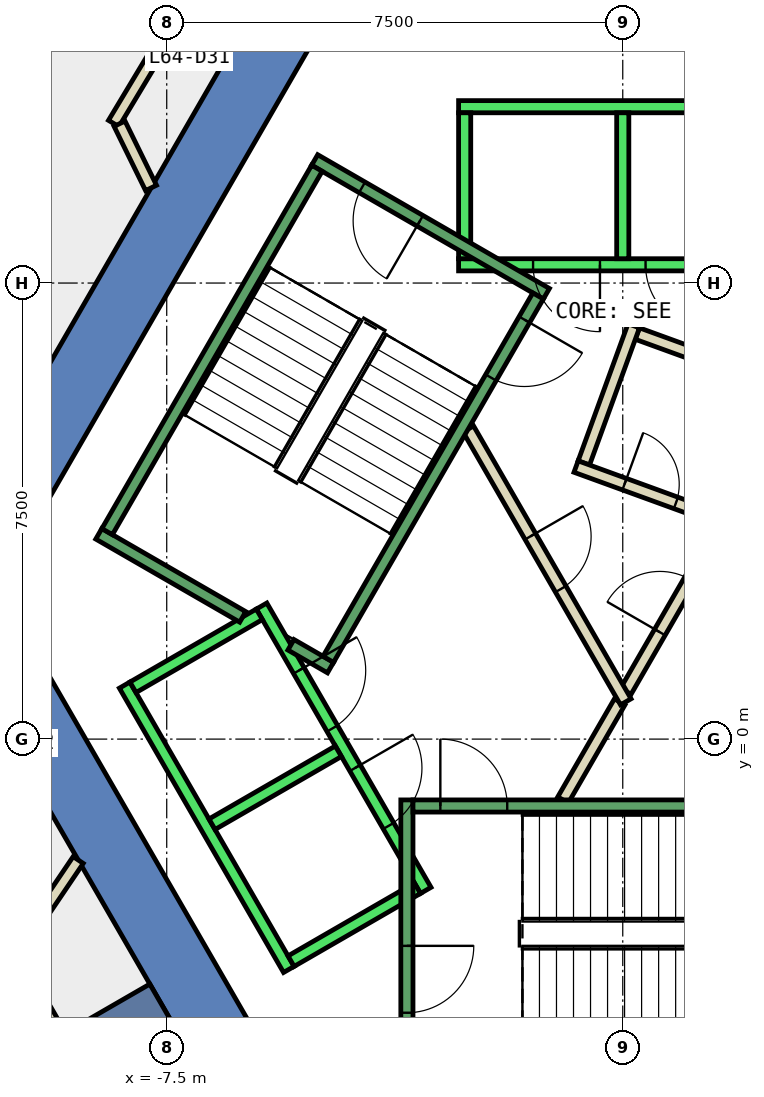
"""IFC4 building model, lengths in metres.
Left out: names, types, materials, properties, quantities, classifications, styles, units other than length and angle.
Written with IfcOpenShell. Run it as: python <this file> out.ifc"""

import sys

from ifc_helpers import new_model, si_unit, direction, frame, frame_2d, origin, place, context, subcontext, project, spatial, polyline, rectangle, outline, extrude, element, fill, save


model = new_model("IFC4")
c1 = context("Model", 3, precision=1e-05, world=origin(), true_north=direction((0.0, 1.0)))
c2 = subcontext(c1, "Body", "Model", "MODEL_VIEW")
j1 = project(units=[si_unit("LENGTHUNIT", "METRE"), si_unit("PLANEANGLEUNIT", "RADIAN")], contexts=[c1])
p1 = place(None, origin())
s1 = spatial("IfcSite", under=j1, at=p1, CompositionType="ELEMENT")
p2 = place(p1, origin())
s2 = spatial("IfcBuilding", under=s1, at=p2, CompositionType="ELEMENT")
p3 = place(p2, frame((0.0, 0.0, 277.4)))
s3 = spatial("IfcBuildingStorey", under=s2, at=p3, CompositionType="ELEMENT", Elevation=277.4)
p4 = place(p3, frame((0.0, 0.0, -0.34)))
e1 = element("IfcWall", 1, at=p4, inside=s3, PredefinedType="SHEAR", context=c2, shape_type="SweptSolid", body=[
    extrude(outline(polyline([(-10.535, 4.253), (-9.583, 3.703), (-5.138, 11.4), (-5.774, 12.5), (-10.535, 4.253)])), origin(), (0.0, 0.0, 1.0), 3.34),
])
p5 = place(p3, frame((0.0, 0.0, -0.34)))
e2 = element("IfcWall", 2, at=p5, inside=s3, PredefinedType="SHEAR", context=c2, shape_type="SweptSolid", body=[
    extrude(outline(polyline([(-11.547, 2.5), (-5.774, -7.5), (-5.138, -6.4), (-10.277, 2.5), (-11.547, 2.5)])), origin(), (0.0, 0.0, 1.0), 3.34),
])
p6 = place(p3, frame((-7.578, -4.375, -0.34), z_axis=(0.0, 0.0, 1.0), x_axis=(-0.866024315419, -0.5000018851, 0.0)))
e3 = element("IfcWall", 3, at=p6, inside=s3, PredefinedType="SHEAR", context=c2, shape_type="SweptSolid", body=[
    extrude(rectangle(XDim=9.0, YDim=0.8, at=frame_2d((4.5, 0.0))), origin(), (0.0, 0.0, 1.0), 3.34),
])
p7 = place(p3, frame((2.005, 6.027, 0.0), z_axis=(0.0, 0.0, 1.0), x_axis=(-0.93978203596, 0.341774377167, 0.0)))
e4 = element("IfcWall", 4, at=p7, inside=s3, PredefinedType="PARTITIONING", context=c2, shape_type="SweptSolid", body=[
    extrude(rectangle(XDim=1.878, YDim=0.2, at=frame_2d((0.939, 0.0))), origin(), (0.0, 0.0, 1.0), 3.0),
])
p8 = place(p3, frame((0.181, 6.797, 0.0), z_axis=(0.0, 0.0, 1.0), x_axis=(-0.342020767299, -0.939692393678, 0.0)))
e5 = element("IfcWall", 5, at=p8, inside=s3, PredefinedType="PARTITIONING", context=c2, shape_type="SweptSolid", body=[
    extrude(rectangle(XDim=2.4, YDim=0.2, at=frame_2d((1.2, 0.0))), origin(), (0.0, 0.0, 1.0), 3.0),
])
p9 = place(p3, frame((-0.768, 4.482, 0.0), z_axis=(0.0, 0.0, 1.0), x_axis=(0.939664280748, -0.342097996905, 0.0)))
e6 = element("IfcWall", 6, at=p9, inside=s3, PredefinedType="PARTITIONING", context=c2, shape_type="SweptSolid", body=[
    extrude(rectangle(XDim=2.595, YDim=0.2, at=frame_2d((1.298, 0.0))), origin(), (0.0, 0.0, 1.0), 3.0),
])
p10 = place(p9, frame((0.848, 0.0, 0.0)))
e7 = element("IfcOpeningElement", 7, at=p10, cuts=e6, PredefinedType="OPENING", context=c2, shape_type="SweptSolid", body=[
    extrude(rectangle(XDim=0.9, YDim=2.1, at=frame_2d((0.45, 1.05))), frame((0.0, 0.11, 0.0), z_axis=(0.0, -1.0, 0.0), x_axis=(1.0, 0.0, 0.0)), (0.0, 0.0, 1.0), 0.22),
])
p11 = place(p3, frame((-5.885, 14.264, 0.0), z_axis=(0.0, 0.0, 1.0), x_axis=(-0.514971458129, -0.857207324579, 0.0)))
e8 = element("IfcWall", 8, at=p11, inside=s3, PredefinedType="PARTITIONING", context=c2, shape_type="SweptSolid", body=[
    extrude(rectangle(XDim=4.83, YDim=0.2, at=frame_2d((2.415, 0.0))), origin(), (0.0, 0.0, 1.0), 3.0),
])
p12 = place(p11, frame((1.915, 0.0, 0.0)))
e9 = element("IfcOpeningElement", 9, at=p12, cuts=e8, PredefinedType="OPENING", context=c2, shape_type="SweptSolid", body=[
    extrude(rectangle(XDim=1.0, YDim=2.1, at=frame_2d((0.5, 1.05))), frame((0.0, 0.11, 0.0), z_axis=(0.0, -1.0, 0.0), x_axis=(1.0, 0.0, 0.0)), (0.0, 0.0, 1.0), 0.22),
])
p13 = place(p3, frame((-8.276, 10.12, 0.0), z_axis=(0.0, 0.0, 1.0), x_axis=(0.440226122236, -0.897886942382, 0.0)))
e10 = element("IfcWall", 10, at=p13, inside=s3, PredefinedType="PARTITIONING", context=c2, shape_type="SweptSolid", body=[
    extrude(rectangle(XDim=1.176, YDim=0.2, at=frame_2d((0.588, 0.0))), origin(), (0.0, 0.0, 1.0), 3.0),
])
p14 = place(p3, frame((-10.789, 9.985, 0.0), z_axis=(0.0, 0.0, 1.0), x_axis=(0.51487988517, 0.857262330823, 0.0)))
e11 = element("IfcWall", 11, at=p14, inside=s3, PredefinedType="PARTITIONING", context=c2, shape_type="SweptSolid", body=[
    extrude(rectangle(XDim=3.177, YDim=0.2, at=frame_2d((1.589, 0.0))), origin(), (0.0, 0.0, 1.0), 3.0),
])
p15 = place(p14, frame((1.089, 0.0, 0.0)))
e12 = element("IfcOpeningElement", 12, at=p15, cuts=e11, PredefinedType="OPENING", context=c2, shape_type="SweptSolid", body=[
    extrude(rectangle(XDim=1.0, YDim=2.1, at=frame_2d((0.5, 1.05))), frame((0.0, 0.11, 0.0), z_axis=(0.0, -1.0, 0.0), x_axis=(1.0, 0.0, 0.0)), (0.0, 0.0, 1.0), 0.22),
])
p16 = place(p3, frame((-10.028, -3.575, 0.0), z_axis=(0.0, 0.0, 1.0), x_axis=(0.559779346026, 0.828641710127, 0.0)))
e13 = element("IfcWall", 13, at=p16, inside=s3, PredefinedType="PARTITIONING", context=c2, shape_type="SweptSolid", body=[
    extrude(rectangle(XDim=1.915, YDim=0.2, at=frame_2d((0.958, 0.0))), origin(), (0.0, 0.0, 1.0), 3.0),
])
p17 = place(p3, frame((-0.982, -1.0, 0.0), z_axis=(0.0, 0.0, 1.0), x_axis=(0.50024047865, 0.865886518847, 0.0)))
e14 = element("IfcWall", 14, at=p17, inside=s3, PredefinedType="PARTITIONING", context=c2, shape_type="SweptSolid", body=[
    extrude(rectangle(XDim=1.863, YDim=0.2, at=frame_2d((0.931, 0.0))), origin(), (0.0, 0.0, 1.0), 3.0),
])
p18 = place(p3, frame((0.05, 0.787, 0.0), z_axis=(0.0, 0.0, 1.0), x_axis=(0.500036563046, 0.866004293071, 0.0)))
e15 = element("IfcWall", 15, at=p18, inside=s3, PredefinedType="PARTITIONING", context=c2, shape_type="SweptSolid", body=[
    extrude(rectangle(XDim=3.342, YDim=0.2, at=frame_2d((1.671, 0.0))), origin(), (0.0, 0.0, 1.0), 3.0),
])
p19 = place(p18, frame((1.121, 0.0, 0.0)))
e16 = element("IfcOpeningElement", 16, at=p19, cuts=e15, PredefinedType="OPENING", context=c2, shape_type="SweptSolid", body=[
    extrude(rectangle(XDim=1.0, YDim=2.1, at=frame_2d((0.5, 1.05))), frame((0.0, 0.11, 0.0), z_axis=(0.0, -1.0, 0.0), x_axis=(1.0, 0.0, 0.0)), (0.0, 0.0, 1.0), 0.22),
])
p20 = place(p3, frame((-2.54, 5.1, 0.0), z_axis=(0.0, 0.0, 1.0), x_axis=(0.499925051871, -0.866068670783, 0.0)))
e17 = element("IfcWall", 17, at=p20, inside=s3, PredefinedType="PARTITIONING", context=c2, shape_type="SweptSolid", body=[
    extrude(rectangle(XDim=5.181, YDim=0.2, at=frame_2d((2.59, 0.0))), origin(), (0.0, 0.0, 1.0), 3.0),
])
p21 = place(p20, frame((2.04, 0.0, 0.0)))
e18 = element("IfcOpeningElement", 18, at=p21, cuts=e17, PredefinedType="OPENING", context=c2, shape_type="SweptSolid", body=[
    extrude(rectangle(XDim=1.0, YDim=2.1, at=frame_2d((0.5, 1.05))), frame((0.0, 0.11, 0.0), z_axis=(0.0, -1.0, 0.0), x_axis=(1.0, 0.0, 0.0)), (0.0, 0.0, 1.0), 0.22),
])
p22 = place(p3, frame((-9.316, -4.764, 0.0), z_axis=(0.0, 0.0, 1.0), x_axis=(-0.49996696679, 0.866044474677, 0.0)))
e19 = element("IfcWall", 19, at=p22, inside=s3, PredefinedType="PARTITIONING", context=c2, shape_type="SweptSolid", body=[
    extrude(rectangle(XDim=1.296, YDim=0.2, at=frame_2d((0.648, 0.0))), origin(), (0.0, 0.0, 1.0), 3.0),
])
p23 = place(p3, frame((2.7, 7.8, 0.0), z_axis=(0.0, 0.0, 1.0), x_axis=(-1.0, 0.0, 0.0)))
e20 = element("IfcWall", 20, at=p23, inside=s3, PredefinedType="STANDARD", context=c2, shape_type="SweptSolid", body=[
    extrude(rectangle(XDim=5.4, YDim=0.2, at=frame_2d((2.7, 0.0))), origin(), (0.0, 0.0, 1.0), 3.0),
])
p24 = place(p23, frame((1.225, 0.0, 0.0)))
e21 = element("IfcOpeningElement", 21, at=p24, cuts=e20, PredefinedType="OPENING", context=c2, shape_type="SweptSolid", body=[
    extrude(rectangle(XDim=1.1, YDim=2.1, at=frame_2d((0.55, 1.05))), frame((0.0, 0.11, 0.0), z_axis=(0.0, -1.0, 0.0), x_axis=(1.0, 0.0, 0.0)), (0.0, 0.0, 1.0), 0.22),
])
p25 = place(p23, frame((3.075, 0.0, 0.0)))
e22 = element("IfcOpeningElement", 22, at=p25, cuts=e20, PredefinedType="OPENING", context=c2, shape_type="SweptSolid", body=[
    extrude(rectangle(XDim=1.1, YDim=2.1, at=frame_2d((0.55, 1.05))), frame((0.0, 0.11, 0.0), z_axis=(0.0, -1.0, 0.0), x_axis=(1.0, 0.0, 0.0)), (0.0, 0.0, 1.0), 0.22),
])
p26 = place(p3, frame((2.7, 10.4, 0.0), z_axis=(0.0, 0.0, 1.0), x_axis=(-1.0, 0.0, 0.0)))
e23 = element("IfcWall", 23, at=p26, inside=s3, PredefinedType="STANDARD", context=c2, shape_type="SweptSolid", body=[
    extrude(rectangle(XDim=5.4, YDim=0.2, at=frame_2d((2.7, 0.0))), origin(), (0.0, 0.0, 1.0), 3.0),
])
for number, where, z_axis, x_axis in (
    (24, (0.0, 7.9, 0.0), (0.0, 0.0, 1.0), (0.0, 1.0, 0.0)),
    (25, (-2.6, 7.9, 0.0), (0.0, 0.0, 1.0), (0.0, 1.0, 0.0)),
):
    element("IfcWall", number, at=place(p3, frame(where, z_axis=z_axis, x_axis=x_axis)), inside=s3, PredefinedType="STANDARD", context=c2, shape_type="SweptSolid", body=[
        extrude(rectangle(XDim=2.4, YDim=0.2, at=frame_2d((1.2, 0.0))), origin(), (0.0, 0.0, 1.0), 3.0),
    ])
p27 = place(p3, frame((-5.94, 2.188, 0.0), z_axis=(0.0, 0.0, 1.0), x_axis=(0.500034260056, -0.866005622828, 0.0)))
e26 = element("IfcWall", 26, at=p27, inside=s3, PredefinedType="STANDARD", context=c2, shape_type="SweptSolid", body=[
    extrude(rectangle(XDim=5.399, YDim=0.2, at=frame_2d((2.7, 0.0))), origin(), (0.0, 0.0, 1.0), 3.0),
])
p28 = place(p27, frame((3.075, 0.0, 0.0)))
e27 = element("IfcOpeningElement", 27, at=p28, cuts=e26, PredefinedType="OPENING", context=c2, shape_type="SweptSolid", body=[
    extrude(rectangle(XDim=1.1, YDim=2.1, at=frame_2d((0.55, 1.05))), frame((0.0, 0.11, 0.0), z_axis=(0.0, -1.0, 0.0), x_axis=(1.0, 0.0, 0.0)), (0.0, 0.0, 1.0), 0.22),
])
p29 = place(p27, frame((1.225, 0.0, 0.0)))
e28 = element("IfcOpeningElement", 28, at=p29, cuts=e26, PredefinedType="OPENING", context=c2, shape_type="SweptSolid", body=[
    extrude(rectangle(XDim=1.1, YDim=2.1, at=frame_2d((0.55, 1.05))), frame((0.0, 0.11, 0.0), z_axis=(0.0, -1.0, 0.0), x_axis=(1.0, 0.0, 0.0)), (0.0, 0.0, 1.0), 0.22),
])
p30 = place(p3, frame((-8.192, 0.888, 0.0), z_axis=(0.0, 0.0, 1.0), x_axis=(0.500034260056, -0.866005622828, 0.0)))
e29 = element("IfcWall", 29, at=p30, inside=s3, PredefinedType="STANDARD", context=c2, shape_type="SweptSolid", body=[
    extrude(rectangle(XDim=5.399, YDim=0.2, at=frame_2d((2.7, 0.0))), origin(), (0.0, 0.0, 1.0), 3.0),
])
for number, where, z_axis, x_axis in (
    (30, (-5.977, 2.052, 0.0), (0.0, 0.0, 1.0), (-0.866, -0.5, 0.0)),
    (31, (-4.677, -0.2, 0.0), (0.0, 0.0, 1.0), (-0.866, -0.5, 0.0)),
):
    element("IfcWall", number, at=place(p3, frame(where, z_axis=z_axis, x_axis=x_axis)), inside=s3, PredefinedType="STANDARD", context=c2, shape_type="SweptSolid", body=[
        extrude(rectangle(XDim=2.399, YDim=0.2, at=frame_2d((1.2, 0.0))), origin(), (0.0, 0.0, 1.0), 3.0),
    ])
p31 = place(p3, frame((-3.377, -2.452, 0.0), z_axis=(0.0, 0.0, 1.0), x_axis=(-0.865955154139, -0.50012165622, 0.0)))
e32 = element("IfcWall", 32, at=p31, inside=s3, PredefinedType="STANDARD", context=c2, shape_type="SweptSolid", body=[
    extrude(rectangle(XDim=2.4, YDim=0.2, at=frame_2d((1.2, 0.0))), origin(), (0.0, 0.0, 1.0), 3.0),
])
p32 = place(p3, frame((-3.55, -1.0, 0.0), z_axis=(0.0, 0.0, 1.0), x_axis=(0.0, -1.0, 0.0)))
e33 = element("IfcWall", 33, at=p32, inside=s3, PredefinedType="STANDARD", context=c2, shape_type="SweptSolid", body=[
    extrude(rectangle(XDim=4.4, YDim=0.2, at=frame_2d((2.2, 0.0))), origin(), (0.0, 0.0, 1.0), 3.0),
])
p33 = place(p32, frame((2.4, 0.0, 0.0)))
e34 = element("IfcOpeningElement", 34, at=p33, cuts=e33, PredefinedType="OPENING", context=c2, shape_type="SweptSolid", body=[
    extrude(rectangle(XDim=1.1, YDim=2.2, at=frame_2d((0.55, 1.1))), frame((0.0, 0.11, 0.0), z_axis=(0.0, -1.0, 0.0), x_axis=(1.0, 0.0, 0.0)), (0.0, 0.0, 1.0), 0.22),
])
p34 = place(p3, frame((-3.45, -1.1, 0.0), z_axis=(0.0, 0.0, 1.0), x_axis=(1.0, 0.0, 0.0)))
e35 = element("IfcWall", 35, at=p34, inside=s3, PredefinedType="STANDARD", context=c2, shape_type="SweptSolid", body=[
    extrude(rectangle(XDim=6.9, YDim=0.2, at=frame_2d((3.45, 0.0))), origin(), (0.0, 0.0, 1.0), 3.0),
])
p35 = place(p34, frame((0.45, 0.0, 0.0)))
e36 = element("IfcOpeningElement", 36, at=p35, cuts=e35, PredefinedType="OPENING", context=c2, shape_type="SweptSolid", body=[
    extrude(rectangle(XDim=1.1, YDim=2.2, at=frame_2d((0.55, 1.1))), frame((0.0, 0.11, 0.0), z_axis=(0.0, -1.0, 0.0), x_axis=(1.0, 0.0, 0.0)), (0.0, 0.0, 1.0), 0.22),
])
p36 = place(p3, frame((-1.256, 7.324, 0.0), z_axis=(0.0, 0.0, 1.0), x_axis=(-0.866046073146, 0.499964197906, 0.0)))
e37 = element("IfcWall", 37, at=p36, inside=s3, PredefinedType="STANDARD", context=c2, shape_type="SweptSolid", body=[
    extrude(rectangle(XDim=4.4, YDim=0.2, at=frame_2d((2.2, 0.0))), origin(), (0.0, 0.0, 1.0), 3.0),
])
p37 = place(p36, frame((2.4, 0.0, 0.0)))
e38 = element("IfcOpeningElement", 38, at=p37, cuts=e37, PredefinedType="OPENING", context=c2, shape_type="SweptSolid", body=[
    extrude(rectangle(XDim=1.1, YDim=2.2, at=frame_2d((0.55, 1.1))), frame((0.0, 0.11, 0.0), z_axis=(0.0, -1.0, 0.0), x_axis=(1.0, 0.0, 0.0)), (0.0, 0.0, 1.0), 0.22),
])
p38 = place(p3, frame((-6.25, 2.01, 0.0), z_axis=(0.0, 0.0, 1.0), x_axis=(-0.86611865017, 0.499838457731, 0.0)))
e39 = element("IfcWall", 39, at=p38, inside=s3, PredefinedType="STANDARD", context=c2, shape_type="SweptSolid", body=[
    extrude(rectangle(XDim=2.733, YDim=0.2, at=frame_2d((1.366, 0.0))), origin(), (0.0, 0.0, 1.0), 3.0),
])
p39 = place(p3, frame((-4.806, 1.176, 0.0), z_axis=(0.0, 0.0, 1.0), x_axis=(-0.866558586415, 0.499075361355, 0.0)))
e40 = element("IfcWall", 40, at=p39, inside=s3, PredefinedType="STANDARD", context=c2, shape_type="SweptSolid", body=[
    extrude(rectangle(XDim=0.751, YDim=0.2, at=frame_2d((0.376, 0.0))), origin(), (0.0, 0.0, 1.0), 3.0),
])
p40 = place(p3, frame((-1.393, 7.288, 0.0), z_axis=(0.0, 0.0, 1.0), x_axis=(-0.499963383562, -0.866046543262, 0.0)))
e41 = element("IfcWall", 41, at=p40, inside=s3, PredefinedType="STANDARD", context=c2, shape_type="SweptSolid", body=[
    extrude(rectangle(XDim=6.9, YDim=0.2, at=frame_2d((3.45, 0.0))), origin(), (0.0, 0.0, 1.0), 3.0),
])
p41 = place(p40, frame((0.45, 0.0, 0.0)))
e42 = element("IfcOpeningElement", 42, at=p41, cuts=e41, PredefinedType="OPENING", context=c2, shape_type="SweptSolid", body=[
    extrude(rectangle(XDim=1.1, YDim=2.2, at=frame_2d((0.55, 1.1))), frame((0.0, 0.11, 0.0), z_axis=(0.0, -1.0, 0.0), x_axis=(1.0, 0.0, 0.0)), (0.0, 0.0, 1.0), 0.22),
])
p42 = place(p3, frame((-5.03, 9.388, 0.0), z_axis=(0.0, 0.0, 1.0), x_axis=(-0.499978703459, -0.866037698999, 0.0)))
e43 = element("IfcWall", 43, at=p42, inside=s3, PredefinedType="STANDARD", context=c2, shape_type="SweptSolid", body=[
    extrude(rectangle(XDim=6.9, YDim=0.2, at=frame_2d((3.45, 0.0))), origin(), (0.0, 0.0, 1.0), 3.0),
])
p43 = place(p19, origin())
e44 = element("IfcDoor", 44, at=p43, inside=s3, OperationType="SINGLE_SWING_LEFT", PredefinedType="DOOR", context=c2, shape_type="SweptSolid", body=[
    extrude(rectangle(XDim=1.0, YDim=2.1, at=frame_2d((0.5, 1.05))), frame((0.0, 0.025, 0.0), z_axis=(0.0, -1.0, 0.0), x_axis=(1.0, 0.0, 0.0)), (0.0, 0.0, 1.0), 0.05),
])
fill(e16, e44)
p44 = place(p21, origin())
e45 = element("IfcDoor", 45, at=p44, inside=s3, OperationType="SINGLE_SWING_LEFT", PredefinedType="DOOR", context=c2, shape_type="SweptSolid", body=[
    extrude(rectangle(XDim=1.0, YDim=2.1, at=frame_2d((0.5, 1.05))), frame((0.0, 0.025, 0.0), z_axis=(0.0, -1.0, 0.0), x_axis=(1.0, 0.0, 0.0)), (0.0, 0.0, 1.0), 0.05),
])
fill(e18, e45)
p45 = place(p10, origin())
e46 = element("IfcDoor", 46, at=p45, inside=s3, OperationType="SINGLE_SWING_LEFT", PredefinedType="DOOR", context=c2, shape_type="SweptSolid", body=[
    extrude(rectangle(XDim=0.9, YDim=2.1, at=frame_2d((0.45, 1.05))), frame((0.0, 0.025, 0.0), z_axis=(0.0, -1.0, 0.0), x_axis=(1.0, 0.0, 0.0)), (0.0, 0.0, 1.0), 0.05),
])
fill(e7, e46)
p46 = place(p24, origin())
e47 = element("IfcDoor", 47, at=p46, inside=s3, OperationType="SLIDING_TO_LEFT", PredefinedType="DOOR", context=c2, shape_type="SweptSolid", body=[
    extrude(rectangle(XDim=1.1, YDim=2.1, at=frame_2d((0.55, 1.05))), frame((0.0, 0.025, 0.0), z_axis=(0.0, -1.0, 0.0), x_axis=(1.0, 0.0, 0.0)), (0.0, 0.0, 1.0), 0.05),
])
fill(e21, e47)
p47 = place(p25, origin())
e48 = element("IfcDoor", 48, at=p47, inside=s3, OperationType="SLIDING_TO_LEFT", PredefinedType="DOOR", context=c2, shape_type="SweptSolid", body=[
    extrude(rectangle(XDim=1.1, YDim=2.1, at=frame_2d((0.55, 1.05))), frame((0.0, 0.025, 0.0), z_axis=(0.0, -1.0, 0.0), x_axis=(1.0, 0.0, 0.0)), (0.0, 0.0, 1.0), 0.05),
])
fill(e22, e48)
p48 = place(p28, origin())
e49 = element("IfcDoor", 49, at=p48, inside=s3, OperationType="SLIDING_TO_LEFT", PredefinedType="DOOR", context=c2, shape_type="SweptSolid", body=[
    extrude(rectangle(XDim=1.1, YDim=2.1, at=frame_2d((0.55, 1.05))), frame((0.0, 0.025, 0.0), z_axis=(0.0, -1.0, 0.0), x_axis=(1.0, 0.0, 0.0)), (0.0, 0.0, 1.0), 0.05),
])
fill(e27, e49)
p49 = place(p29, origin())
e50 = element("IfcDoor", 50, at=p49, inside=s3, OperationType="SLIDING_TO_LEFT", PredefinedType="DOOR", context=c2, shape_type="SweptSolid", body=[
    extrude(rectangle(XDim=1.1, YDim=2.1, at=frame_2d((0.55, 1.05))), frame((0.0, 0.025, 0.0), z_axis=(0.0, -1.0, 0.0), x_axis=(1.0, 0.0, 0.0)), (0.0, 0.0, 1.0), 0.05),
])
fill(e28, e50)
p50 = place(p35, origin())
e51 = element("IfcDoor", 51, at=p50, inside=s3, OperationType="SINGLE_SWING_LEFT", PredefinedType="DOOR", context=c2, shape_type="SweptSolid", body=[
    extrude(rectangle(XDim=1.1, YDim=2.2, at=frame_2d((0.55, 1.1))), frame((0.0, 0.025, 0.0), z_axis=(0.0, -1.0, 0.0), x_axis=(1.0, 0.0, 0.0)), (0.0, 0.0, 1.0), 0.05),
])
fill(e36, e51)
p51 = place(p33, origin())
e52 = element("IfcDoor", 52, at=p51, inside=s3, OperationType="SINGLE_SWING_LEFT", PredefinedType="DOOR", context=c2, shape_type="SweptSolid", body=[
    extrude(rectangle(XDim=1.1, YDim=2.2, at=frame_2d((0.55, 1.1))), frame((0.0, 0.025, 0.0), z_axis=(0.0, -1.0, 0.0), x_axis=(1.0, 0.0, 0.0)), (0.0, 0.0, 1.0), 0.05),
])
fill(e34, e52)
p52 = place(p41, origin())
e53 = element("IfcDoor", 53, at=p52, inside=s3, OperationType="SINGLE_SWING_LEFT", PredefinedType="DOOR", context=c2, shape_type="SweptSolid", body=[
    extrude(rectangle(XDim=1.1, YDim=2.2, at=frame_2d((0.55, 1.1))), frame((0.0, 0.025, 0.0), z_axis=(0.0, -1.0, 0.0), x_axis=(1.0, 0.0, 0.0)), (0.0, 0.0, 1.0), 0.05),
])
fill(e42, e53)
p53 = place(p37, origin())
e54 = element("IfcDoor", 54, at=p53, inside=s3, OperationType="SINGLE_SWING_LEFT", PredefinedType="DOOR", context=c2, shape_type="SweptSolid", body=[
    extrude(rectangle(XDim=1.1, YDim=2.2, at=frame_2d((0.55, 1.1))), frame((0.0, 0.025, 0.0), z_axis=(0.0, -1.0, 0.0), x_axis=(1.0, 0.0, 0.0)), (0.0, 0.0, 1.0), 0.05),
])
fill(e38, e54)
save(model, sys.argv[1])
